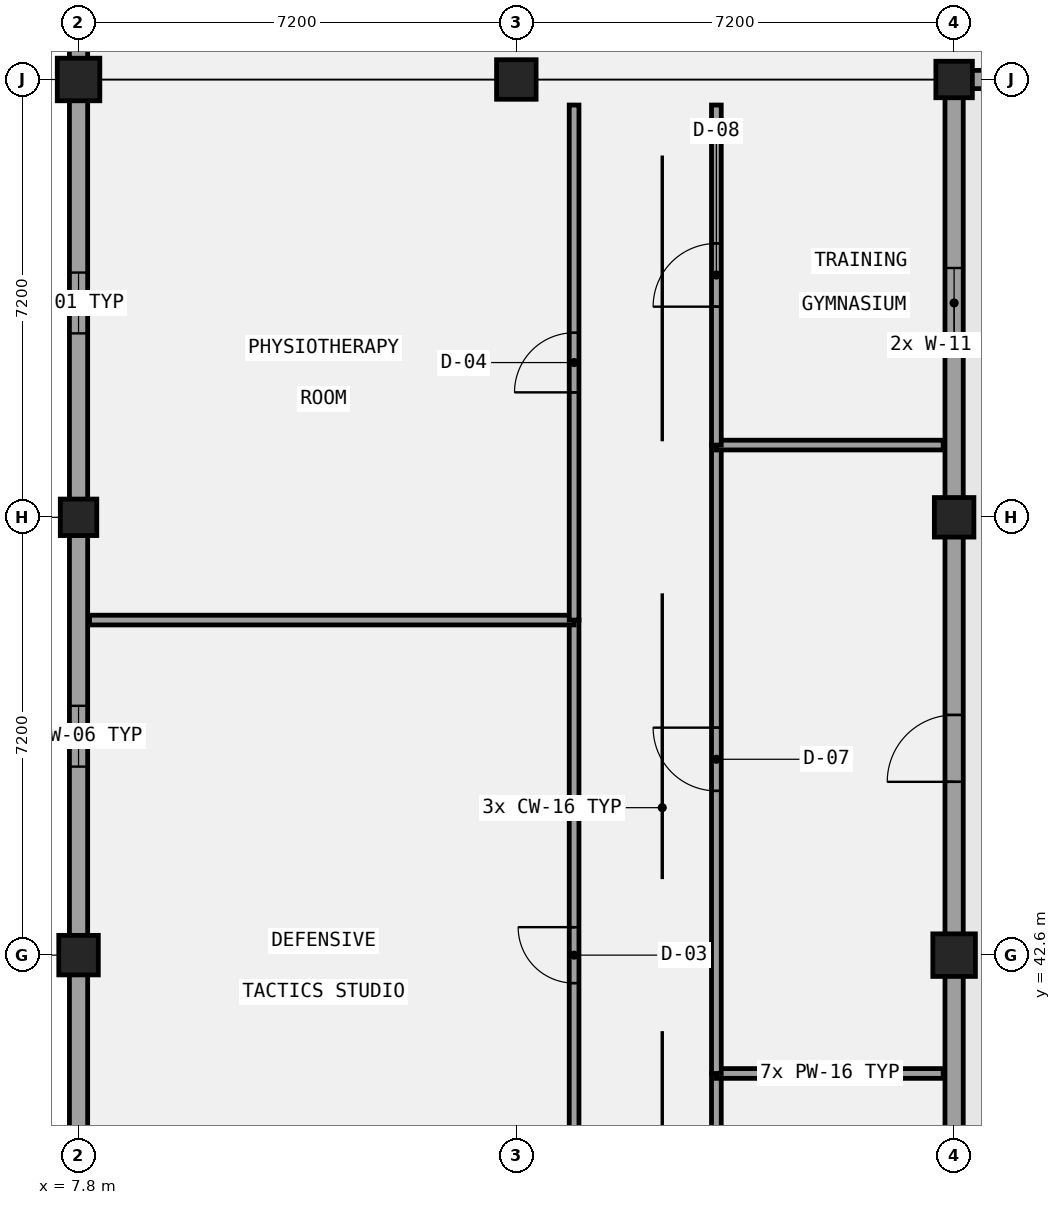
"""IFC4 building model, lengths in metres.
Left out: names, types, materials, properties, quantities, classifications, styles, units other than length and angle.
Written with IfcOpenShell. Run it as: python <this file> out.ifc"""

import sys

from ifc_helpers import new_model, si_unit, direction, frame, frame_2d, origin, origin_2d, place, context, subcontext, project, spatial, rectangle, extrude, element, fill, save


model = new_model("IFC4")
c1 = context("Model", 3, precision=1e-05, world=origin(), true_north=direction((0.0, 1.0)))
c2 = subcontext(c1, "Body", "Model", "MODEL_VIEW")
j1 = project(units=[si_unit("LENGTHUNIT", "METRE"), si_unit("PLANEANGLEUNIT", "RADIAN")], contexts=[c1])
p1 = place(None, origin())
s1 = spatial("IfcSite", under=j1, at=p1, CompositionType="ELEMENT")
p2 = place(p1, origin())
s2 = spatial("IfcBuilding", under=s1, at=p2, CompositionType="ELEMENT")
p3 = place(p2, frame((0.0, 0.0, 13.8)))
s3 = spatial("IfcBuildingStorey", under=s2, at=p3, CompositionType="ELEMENT", Elevation=13.8)
p4 = place(p3, frame((7.8, 42.6, 0.0), z_axis=(0.0, 0.0, 1.0), x_axis=(1.0, 0.0, 0.0)))
e1 = element("IfcColumn", 1, at=p4, inside=s3, PredefinedType="COLUMN", context=c2, shape_type="SweptSolid", body=[
    extrude(rectangle(XDim=0.65, YDim=0.65, at=origin_2d()), origin(), (0.0, 0.0, 1.0), 4.2),
])
p5 = place(p3, frame((7.8, 49.8, 0.0), z_axis=(0.0, 0.0, 1.0), x_axis=(1.0, 0.0, 0.0)))
e2 = element("IfcColumn", 2, at=p5, inside=s3, PredefinedType="COLUMN", context=c2, shape_type="SweptSolid", body=[
    extrude(rectangle(XDim=0.6, YDim=0.6, at=origin_2d()), origin(), (0.0, 0.0, 1.0), 4.2),
])
p6 = place(p3, frame((7.8, 57.0, 0.0), z_axis=(0.0, 0.0, 1.0), x_axis=(1.0, 0.0, 0.0)))
e3 = element("IfcColumn", 3, at=p6, inside=s3, PredefinedType="COLUMN", context=c2, shape_type="SweptSolid", body=[
    extrude(rectangle(XDim=0.7, YDim=0.7, at=origin_2d()), origin(), (0.0, 0.0, 1.0), 4.2),
])
p7 = place(p3, frame((15.0, 57.0, 0.0), z_axis=(0.0, 0.0, 1.0), x_axis=(1.0, 0.0, 0.0)))
e4 = element("IfcColumn", 4, at=p7, inside=s3, PredefinedType="COLUMN", context=c2, shape_type="SweptSolid", body=[
    extrude(rectangle(XDim=0.65, YDim=0.65, at=origin_2d()), origin(), (0.0, 0.0, 1.0), 4.2),
])
p8 = place(p3, frame((22.2, 42.6, 0.0), z_axis=(0.0, 0.0, 1.0), x_axis=(1.0, 0.0, 0.0)))
e5 = element("IfcColumn", 5, at=p8, inside=s3, PredefinedType="COLUMN", context=c2, shape_type="SweptSolid", body=[
    extrude(rectangle(XDim=0.7, YDim=0.7, at=origin_2d()), origin(), (0.0, 0.0, 1.0), 4.2),
])
p9 = place(p3, frame((22.2, 49.8, 0.0), z_axis=(0.0, 0.0, 1.0), x_axis=(1.0, 0.0, 0.0)))
e6 = element("IfcColumn", 6, at=p9, inside=s3, PredefinedType="COLUMN", context=c2, shape_type="SweptSolid", body=[
    extrude(rectangle(XDim=0.65, YDim=0.65, at=origin_2d()), origin(), (0.0, 0.0, 1.0), 4.2),
])
p10 = place(p3, frame((22.2, 57.0, 0.0), z_axis=(0.0, 0.0, 1.0), x_axis=(1.0, 0.0, 0.0)))
e7 = element("IfcColumn", 7, at=p10, inside=s3, PredefinedType="COLUMN", context=c2, shape_type="SweptSolid", body=[
    extrude(rectangle(XDim=0.6, YDim=0.6, at=origin_2d()), origin(), (0.0, 0.0, 1.0), 4.2),
])
p11 = place(p3, frame((22.2, 28.35, 0.0), z_axis=(0.0, 0.0, 1.0), x_axis=(0.0, 1.0, 0.0)))
e8 = element("IfcWall", 8, at=p11, inside=s3, PredefinedType="SOLIDWALL", context=c2, shape_type="SweptSolid", body=[
    extrude(rectangle(XDim=28.5, YDim=0.3, at=frame_2d((14.25, 0.0))), origin(), (0.0, 0.0, 1.0), 2.94),
])
p12 = place(p11, frame((17.1, 0.0, 0.0)))
e9 = element("IfcOpeningElement", 9, at=p12, cuts=e8, PredefinedType="OPENING", context=c2, shape_type="SweptSolid", body=[
    extrude(rectangle(XDim=1.1, YDim=2.2, at=frame_2d((0.55, 1.1))), frame((0.0, 0.16, 0.0), z_axis=(0.0, -1.0, 0.0), x_axis=(1.0, 0.0, 0.0)), (0.0, 0.0, 1.0), 0.32),
])
p13 = place(p11, frame((2.95, 0.0, 1.0)))
e10 = element("IfcOpeningElement", 10, at=p13, cuts=e8, PredefinedType="OPENING", context=c2, shape_type="SweptSolid", body=[
    extrude(rectangle(XDim=1.15, YDim=1.4, at=frame_2d((0.575, 0.7))), frame((0.0, 0.16, 0.0), z_axis=(0.0, -1.0, 0.0), x_axis=(1.0, 0.0, 0.0)), (0.0, 0.0, 1.0), 0.32),
])
p14 = place(p11, frame((10.075, 0.0, 1.0)))
e11 = element("IfcOpeningElement", 11, at=p14, cuts=e8, PredefinedType="OPENING", context=c2, shape_type="SweptSolid", body=[
    extrude(rectangle(XDim=1.15, YDim=1.4, at=frame_2d((0.575, 0.7))), frame((0.0, 0.16, 0.0), z_axis=(0.0, -1.0, 0.0), x_axis=(1.0, 0.0, 0.0)), (0.0, 0.0, 1.0), 0.32),
])
p15 = place(p11, frame((24.4, 0.0, 1.0)))
e12 = element("IfcOpeningElement", 12, at=p15, cuts=e8, PredefinedType="OPENING", context=c2, shape_type="SweptSolid", body=[
    extrude(rectangle(XDim=1.15, YDim=1.4, at=frame_2d((0.575, 0.7))), frame((0.0, 0.16, 0.0), z_axis=(0.0, -1.0, 0.0), x_axis=(1.0, 0.0, 0.0)), (0.0, 0.0, 1.0), 0.32),
])
p16 = place(p3, frame((22.05, 57.0, 0.0), z_axis=(0.0, 0.0, 1.0), x_axis=(1.0, 0.0, 0.0)))
e13 = element("IfcWall", 13, at=p16, inside=s3, PredefinedType="SOLIDWALL", context=c2, shape_type="SweptSolid", body=[
    extrude(rectangle(XDim=7.5, YDim=0.3, at=frame_2d((3.75, 0.0))), origin(), (0.0, 0.0, 1.0), 3.04),
])
p17 = place(p16, frame((2.55, 0.0, 0.0)))
e14 = element("IfcOpeningElement", 14, at=p17, cuts=e13, PredefinedType="OPENING", context=c2, shape_type="SweptSolid", body=[
    extrude(rectangle(XDim=1.1, YDim=2.2, at=frame_2d((0.55, 1.1))), frame((0.0, 0.16, 0.0), z_axis=(0.0, -1.0, 0.0), x_axis=(1.0, 0.0, 0.0)), (0.0, 0.0, 1.0), 0.32),
])
p18 = place(p3, frame((7.8, 64.01, 0.0), z_axis=(0.0, 0.0, 1.0), x_axis=(0.0, -1.0, 0.0)))
e15 = element("IfcWall", 15, at=p18, inside=s3, PredefinedType="SOLIDWALL", context=c2, shape_type="SweptSolid", body=[
    extrude(rectangle(XDim=6.86, YDim=0.3, at=frame_2d((3.43, 0.0))), origin(), (0.0, 0.0, 1.0), 2.94),
])
p19 = place(p18, frame((3.005, 0.0, 1.0)))
e16 = element("IfcOpeningElement", 16, at=p19, cuts=e15, PredefinedType="OPENING", context=c2, shape_type="SweptSolid", body=[
    extrude(rectangle(XDim=0.85, YDim=1.65, at=frame_2d((0.425, 0.825))), frame((0.0, 0.16, 0.0), z_axis=(0.0, -1.0, 0.0), x_axis=(1.0, 0.0, 0.0)), (0.0, 0.0, 1.0), 0.32),
])
p20 = place(p3, frame((7.8, 56.85, 0.0), z_axis=(0.0, 0.0, 1.0), x_axis=(0.0, -1.0, 0.0)))
e17 = element("IfcWall", 17, at=p20, inside=s3, PredefinedType="SOLIDWALL", context=c2, shape_type="SweptSolid", body=[
    extrude(rectangle(XDim=28.5, YDim=0.3, at=frame_2d((14.25, 0.0))), origin(), (0.0, 0.0, 1.0), 3.04),
])
p21 = place(p20, frame((24.475, 0.0, 1.0)))
e18 = element("IfcOpeningElement", 18, at=p21, cuts=e17, PredefinedType="OPENING", context=c2, shape_type="SweptSolid", body=[
    extrude(rectangle(XDim=1.0, YDim=1.4, at=frame_2d((0.5, 0.7))), frame((0.0, 0.16, 0.0), z_axis=(0.0, -1.0, 0.0), x_axis=(1.0, 0.0, 0.0)), (0.0, 0.0, 1.0), 0.32),
])
p22 = place(p20, frame((17.35, 0.0, 1.0)))
e19 = element("IfcOpeningElement", 19, at=p22, cuts=e17, PredefinedType="OPENING", context=c2, shape_type="SweptSolid", body=[
    extrude(rectangle(XDim=1.0, YDim=1.4, at=frame_2d((0.5, 0.7))), frame((0.0, 0.16, 0.0), z_axis=(0.0, -1.0, 0.0), x_axis=(1.0, 0.0, 0.0)), (0.0, 0.0, 1.0), 0.32),
])
p23 = place(p20, frame((10.15, 0.0, 1.0)))
e20 = element("IfcOpeningElement", 20, at=p23, cuts=e17, PredefinedType="OPENING", context=c2, shape_type="SweptSolid", body=[
    extrude(rectangle(XDim=1.0, YDim=1.4, at=frame_2d((0.5, 0.7))), frame((0.0, 0.16, 0.0), z_axis=(0.0, -1.0, 0.0), x_axis=(1.0, 0.0, 0.0)), (0.0, 0.0, 1.0), 0.32),
])
p24 = place(p20, frame((3.025, 0.0, 1.0)))
e21 = element("IfcOpeningElement", 21, at=p24, cuts=e17, PredefinedType="OPENING", context=c2, shape_type="SweptSolid", body=[
    extrude(rectangle(XDim=1.0, YDim=1.4, at=frame_2d((0.5, 0.7))), frame((0.0, 0.16, 0.0), z_axis=(0.0, -1.0, 0.0), x_axis=(1.0, 0.0, 0.0)), (0.0, 0.0, 1.0), 0.32),
])
p25 = place(p3, frame((15.95, 37.09, 0.0), z_axis=(0.0, 0.0, 1.0), x_axis=(0.0, 1.0, 0.0)))
e22 = element("IfcWall", 22, at=p25, inside=s3, PredefinedType="PARTITIONING", context=c2, shape_type="SweptSolid", body=[
    extrude(rectangle(XDim=11.02, YDim=0.16, at=frame_2d((5.51, 0.0))), origin(), (0.0, 0.0, 1.0), 3.94),
])
p26 = place(p25, frame((5.05, 0.0, 0.0)))
e23 = element("IfcOpeningElement", 23, at=p26, cuts=e22, PredefinedType="OPENING", context=c2, shape_type="SweptSolid", body=[
    extrude(rectangle(XDim=0.92, YDim=2.35, at=frame_2d((0.46, 1.175))), frame((0.0, 0.09, 0.0), z_axis=(0.0, -1.0, 0.0), x_axis=(1.0, 0.0, 0.0)), (0.0, 0.0, 1.0), 0.18),
])
p27 = place(p3, frame((7.98, 48.11, 0.0), z_axis=(0.0, 0.0, 1.0), x_axis=(1.0, 0.0, 0.0)))
e24 = element("IfcWall", 24, at=p27, inside=s3, PredefinedType="PARTITIONING", context=c2, shape_type="SweptSolid", body=[
    extrude(rectangle(XDim=7.97, YDim=0.16, at=frame_2d((3.985, 0.0))), origin(), (0.0, 0.0, 1.0), 3.94),
])
p28 = place(p3, frame((15.95, 48.11, 0.0), z_axis=(0.0, 0.0, 1.0), x_axis=(0.0, 1.0, 0.0)))
e25 = element("IfcWall", 25, at=p28, inside=s3, PredefinedType="PARTITIONING", context=c2, shape_type="SweptSolid", body=[
    extrude(rectangle(XDim=8.47, YDim=0.16, at=frame_2d((4.235, 0.0))), origin(), (0.0, 0.0, 1.0), 3.94),
])
p29 = place(p28, frame((3.745, 0.0, 0.0)))
e26 = element("IfcOpeningElement", 26, at=p29, cuts=e25, PredefinedType="OPENING", context=c2, shape_type="SweptSolid", body=[
    extrude(rectangle(XDim=0.98, YDim=2.1, at=frame_2d((0.49, 1.05))), frame((0.0, 0.09, 0.0), z_axis=(0.0, -1.0, 0.0), x_axis=(1.0, 0.0, 0.0)), (0.0, 0.0, 1.0), 0.18),
])
p30 = place(p3, frame((18.29, 34.212, 0.0), z_axis=(0.0, 0.0, 1.0), x_axis=(0.0, 1.0, 0.0)))
e27 = element("IfcWall", 27, at=p30, inside=s3, PredefinedType="PARTITIONING", context=c2, shape_type="SweptSolid", body=[
    extrude(rectangle(XDim=6.442, YDim=0.16, at=frame_2d((3.221, 0.0))), origin(), (0.0, 0.0, 1.0), 3.94),
])
p31 = place(p30, frame((2.731, 0.0, 0.0)))
e28 = element("IfcOpeningElement", 28, at=p31, cuts=e27, PredefinedType="OPENING", context=c2, shape_type="SweptSolid", body=[
    extrude(rectangle(XDim=0.98, YDim=2.35, at=frame_2d((0.49, 1.175))), frame((0.0, 0.09, 0.0), z_axis=(0.0, -1.0, 0.0), x_axis=(1.0, 0.0, 0.0)), (0.0, 0.0, 1.0), 0.18),
])
p32 = place(p3, frame((18.29, 40.654, 0.0), z_axis=(0.0, 0.0, 1.0), x_axis=(1.0, 0.0, 0.0)))
e29 = element("IfcWall", 29, at=p32, inside=s3, PredefinedType="PARTITIONING", context=c2, shape_type="SweptSolid", body=[
    extrude(rectangle(XDim=3.73, YDim=0.16, at=frame_2d((1.865, 0.0))), origin(), (0.0, 0.0, 1.0), 3.94),
])
p33 = place(p3, frame((18.29, 40.654, 0.0), z_axis=(0.0, 0.0, 1.0), x_axis=(0.0, 1.0, 0.0)))
e30 = element("IfcWall", 30, at=p33, inside=s3, PredefinedType="PARTITIONING", context=c2, shape_type="SweptSolid", body=[
    extrude(rectangle(XDim=10.334, YDim=0.16, at=frame_2d((5.167, 0.0))), origin(), (0.0, 0.0, 1.0), 3.94),
])
p34 = place(p33, frame((4.647, 0.0, 0.0)))
e31 = element("IfcOpeningElement", 31, at=p34, cuts=e30, PredefinedType="OPENING", context=c2, shape_type="SweptSolid", body=[
    extrude(rectangle(XDim=1.04, YDim=2.1, at=frame_2d((0.52, 1.05))), frame((0.0, 0.09, 0.0), z_axis=(0.0, -1.0, 0.0), x_axis=(1.0, 0.0, 0.0)), (0.0, 0.0, 1.0), 0.18),
])
p35 = place(p3, frame((18.29, 50.988, 0.0), z_axis=(0.0, 0.0, 1.0), x_axis=(1.0, 0.0, 0.0)))
e32 = element("IfcWall", 32, at=p35, inside=s3, PredefinedType="PARTITIONING", context=c2, shape_type="SweptSolid", body=[
    extrude(rectangle(XDim=3.73, YDim=0.16, at=frame_2d((1.865, 0.0))), origin(), (0.0, 0.0, 1.0), 3.94),
])
p36 = place(p3, frame((18.29, 50.988, 0.0), z_axis=(0.0, 0.0, 1.0), x_axis=(0.0, 1.0, 0.0)))
e33 = element("IfcWall", 33, at=p36, inside=s3, PredefinedType="PARTITIONING", context=c2, shape_type="SweptSolid", body=[
    extrude(rectangle(XDim=5.592, YDim=0.16, at=frame_2d((2.796, 0.0))), origin(), (0.0, 0.0, 1.0), 3.94),
])
p37 = place(p36, frame((2.276, 0.0, 0.0)))
e34 = element("IfcOpeningElement", 34, at=p37, cuts=e33, PredefinedType="OPENING", context=c2, shape_type="SweptSolid", body=[
    extrude(rectangle(XDim=1.04, YDim=2.22, at=frame_2d((0.52, 1.11))), frame((0.0, 0.09, 0.0), z_axis=(0.0, -1.0, 0.0), x_axis=(1.0, 0.0, 0.0)), (0.0, 0.0, 1.0), 0.18),
])
p38 = place(p12, frame((1.1, 0.0, 0.0), z_axis=(0.0, 0.0, 1.0), x_axis=(-1.0, 0.0, 0.0)))
e35 = element("IfcDoor", 35, at=p38, inside=s3, OperationType="SINGLE_SWING_LEFT", PredefinedType="DOOR", context=c2, shape_type="SweptSolid", body=[
    extrude(rectangle(XDim=1.1, YDim=2.2, at=frame_2d((0.55, 1.1))), frame((0.0, 0.025, 0.0), z_axis=(0.0, -1.0, 0.0), x_axis=(1.0, 0.0, 0.0)), (0.0, 0.0, 1.0), 0.05),
])
fill(e9, e35)
p39 = place(p15, origin())
e36 = element("IfcWindow", 36, at=p39, inside=s3, PartitioningType="SINGLE_PANEL", PredefinedType="WINDOW", context=c2, shape_type="SweptSolid", body=[
    extrude(rectangle(XDim=1.15, YDim=1.4, at=frame_2d((0.575, 0.7))), frame((0.0, 0.03, 0.0), z_axis=(0.0, -1.0, 0.0), x_axis=(1.0, 0.0, 0.0)), (0.0, 0.0, 1.0), 0.06),
])
fill(e12, e36)
p40 = place(p23, origin())
e37 = element("IfcWindow", 37, at=p40, inside=s3, PartitioningType="SINGLE_PANEL", PredefinedType="WINDOW", context=c2, shape_type="SweptSolid", body=[
    extrude(rectangle(XDim=1.0, YDim=1.4, at=frame_2d((0.5, 0.7))), frame((0.0, 0.03, 0.0), z_axis=(0.0, -1.0, 0.0), x_axis=(1.0, 0.0, 0.0)), (0.0, 0.0, 1.0), 0.06),
])
fill(e20, e37)
p41 = place(p24, origin())
e38 = element("IfcWindow", 38, at=p41, inside=s3, PartitioningType="SINGLE_PANEL", PredefinedType="WINDOW", context=c2, shape_type="SweptSolid", body=[
    extrude(rectangle(XDim=1.0, YDim=1.4, at=frame_2d((0.5, 0.7))), frame((0.0, 0.03, 0.0), z_axis=(0.0, -1.0, 0.0), x_axis=(1.0, 0.0, 0.0)), (0.0, 0.0, 1.0), 0.06),
])
fill(e21, e38)
p42 = place(p26, frame((0.92, 0.0, 0.0), z_axis=(0.0, 0.0, 1.0), x_axis=(-1.0, 0.0, 0.0)))
e39 = element("IfcDoor", 39, at=p42, inside=s3, OperationType="SINGLE_SWING_RIGHT", PredefinedType="DOOR", context=c2, shape_type="SweptSolid", body=[
    extrude(rectangle(XDim=0.92, YDim=2.35, at=frame_2d((0.46, 1.175))), frame((0.0, 0.025, 0.0), z_axis=(0.0, -1.0, 0.0), x_axis=(1.0, 0.0, 0.0)), (0.0, 0.0, 1.0), 0.05),
])
fill(e23, e39)
p43 = place(p29, frame((0.98, 0.0, 0.0), z_axis=(0.0, 0.0, 1.0), x_axis=(-1.0, 0.0, 0.0)))
e40 = element("IfcDoor", 40, at=p43, inside=s3, OperationType="SINGLE_SWING_LEFT", PredefinedType="DOOR", context=c2, shape_type="SweptSolid", body=[
    extrude(rectangle(XDim=0.98, YDim=2.1, at=frame_2d((0.49, 1.05))), frame((0.0, 0.025, 0.0), z_axis=(0.0, -1.0, 0.0), x_axis=(1.0, 0.0, 0.0)), (0.0, 0.0, 1.0), 0.05),
])
fill(e26, e40)
p44 = place(p34, origin())
e41 = element("IfcDoor", 41, at=p44, inside=s3, OperationType="SINGLE_SWING_RIGHT", PredefinedType="DOOR", context=c2, shape_type="SweptSolid", body=[
    extrude(rectangle(XDim=1.04, YDim=2.1, at=frame_2d((0.52, 1.05))), frame((0.0, 0.025, 0.0), z_axis=(0.0, -1.0, 0.0), x_axis=(1.0, 0.0, 0.0)), (0.0, 0.0, 1.0), 0.05),
])
fill(e31, e41)
p45 = place(p37, origin())
e42 = element("IfcDoor", 42, at=p45, inside=s3, OperationType="SINGLE_SWING_LEFT", PredefinedType="DOOR", context=c2, shape_type="SweptSolid", body=[
    extrude(rectangle(XDim=1.04, YDim=2.22, at=frame_2d((0.52, 1.11))), frame((0.0, 0.025, 0.0), z_axis=(0.0, -1.0, 0.0), x_axis=(1.0, 0.0, 0.0)), (0.0, 0.0, 1.0), 0.05),
])
fill(e34, e42)
save(model, sys.argv[1])
